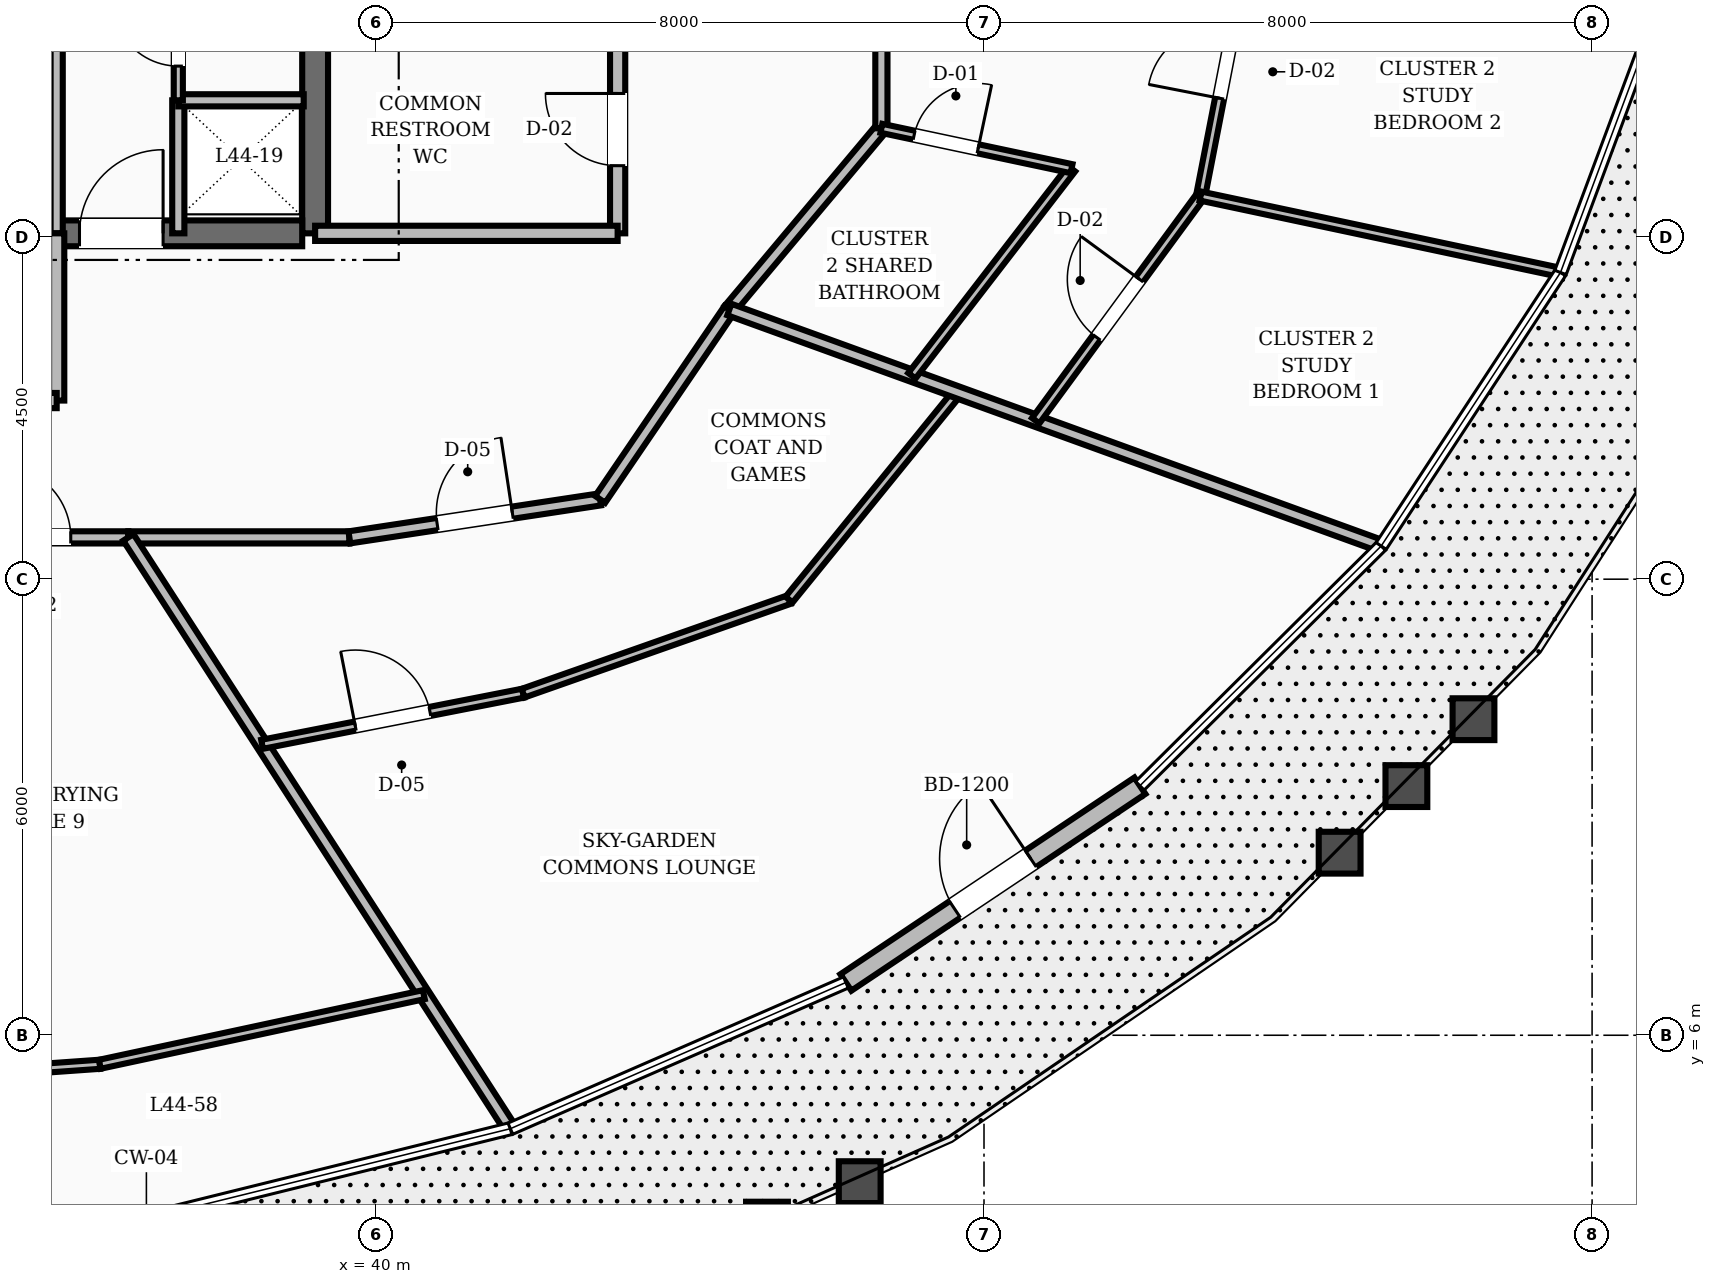
"""IFC4 building model, lengths in metres.
Left out: names, types, materials, properties, quantities, classifications, styles, units other than length and angle.
Written with IfcOpenShell. Run it as: python <this file> out.ifc"""

import sys

from ifc_helpers import new_model, si_unit, direction, frame, frame_2d, origin, place, context, subcontext, project, spatial, rectangle, extrude, element, fill, save


model = new_model("IFC4")
c1 = context("Model", 3, precision=1e-05, world=origin(), true_north=direction((0.0, 1.0)))
c2 = subcontext(c1, "Body", "Model", "MODEL_VIEW")
j1 = project(units=[si_unit("LENGTHUNIT", "METRE"), si_unit("PLANEANGLEUNIT", "RADIAN")], contexts=[c1])
p1 = place(None, origin())
s1 = spatial("IfcSite", under=j1, at=p1, CompositionType="ELEMENT")
p2 = place(p1, origin())
s2 = spatial("IfcBuilding", under=s1, at=p2, CompositionType="ELEMENT")
p3 = place(p2, frame((0.0, 0.0, 171.2)))
s3 = spatial("IfcBuildingStorey", under=s2, at=p3, CompositionType="ELEMENT", Elevation=171.2)
p4 = place(p3, frame((39.2, 16.55, 0.0), z_axis=(0.0, 0.0, 1.0), x_axis=(0.0, 1.0, 0.0)))
e1 = element("IfcWall", 1, at=p4, inside=s3, PredefinedType="SHEAR", context=c2, shape_type="SweptSolid", body=[
    extrude(rectangle(XDim=6.3, YDim=0.34, at=frame_2d((3.15, 0.0))), origin(), (0.0, 0.0, 1.0), 3.6),
])
p5 = place(p3, frame((35.8, 16.55, 0.0), z_axis=(0.0, 0.0, 1.0), x_axis=(1.0, 0.0, 0.0)))
e2 = element("IfcWall", 2, at=p5, inside=s3, PredefinedType="SHEAR", context=c2, shape_type="SweptSolid", body=[
    extrude(rectangle(XDim=3.23, YDim=0.34, at=frame_2d((1.615, 0.0))), origin(), (0.0, 0.0, 1.0), 3.6),
])
p6 = place(p5, frame((0.3, 0.0, 0.0)))
e3 = element("IfcOpeningElement", 3, at=p6, cuts=e2, PredefinedType="OPENING", context=c2, shape_type="SweptSolid", body=[
    extrude(rectangle(XDim=1.1, YDim=2.1, at=frame_2d((0.55, 1.05))), frame((0.0, 0.18, 0.0), z_axis=(0.0, -1.0, 0.0), x_axis=(1.0, 0.0, 0.0)), (0.0, 0.0, 1.0), 0.36),
])
p7 = place(p3, frame((46.183, 6.694, 0.0), z_axis=(0.0, 0.0, 1.0), x_axis=(0.831072563945, 0.556163998707, 0.0)))
e4 = element("IfcWall", 4, at=p7, inside=s3, PredefinedType="STANDARD", context=c2, shape_type="SweptSolid", body=[
    extrude(rectangle(XDim=4.655, YDim=0.26, at=frame_2d((2.327, 0.0))), origin(), (0.0, 0.0, 1.0), 2.82),
])
p8 = place(p7, frame((1.727, 0.0, 0.0)))
e5 = element("IfcOpeningElement", 5, at=p8, cuts=e4, PredefinedType="OPENING", context=c2, shape_type="SweptSolid", body=[
    extrude(rectangle(XDim=1.2, YDim=2.15, at=frame_2d((0.6, 1.075))), frame((0.0, 0.14, 0.0), z_axis=(0.0, -1.0, 0.0), x_axis=(1.0, 0.0, 0.0)), (0.0, 0.0, 1.0), 0.28),
])
p9 = place(p3, frame((43.18, 16.55, 0.0), z_axis=(0.0, 0.0, 1.0), x_axis=(0.0, 1.0, 0.0)))
e6 = element("IfcWall", 6, at=p9, inside=s3, PredefinedType="SOLIDWALL", context=c2, shape_type="SweptSolid", body=[
    extrude(rectangle(XDim=2.73, YDim=0.2, at=frame_2d((1.365, 0.0))), origin(), (0.0, 0.0, 1.0), 2.8),
])
p10 = place(p9, frame((0.89, 0.0, 0.0)))
e7 = element("IfcOpeningElement", 7, at=p10, cuts=e6, PredefinedType="OPENING", context=c2, shape_type="SweptSolid", body=[
    extrude(rectangle(XDim=0.95, YDim=2.1, at=frame_2d((0.475, 1.05))), frame((0.0, 0.11, 0.0), z_axis=(0.0, -1.0, 0.0), x_axis=(1.0, 0.0, 0.0)), (0.0, 0.0, 1.0), 0.22),
])
p11 = place(p3, frame((39.2, 16.55, 0.0), z_axis=(0.0, 0.0, 1.0), x_axis=(1.0, 0.0, 0.0)))
e8 = element("IfcWall", 8, at=p11, inside=s3, PredefinedType="SOLIDWALL", context=c2, shape_type="SweptSolid", body=[
    extrude(rectangle(XDim=3.98, YDim=0.2, at=frame_2d((1.99, 0.0))), origin(), (0.0, 0.0, 1.0), 2.8),
])
p12 = place(p3, frame((35.8, 16.55, 0.0), z_axis=(0.0, 0.0, 1.0), x_axis=(0.0, 1.0, 0.0)))
e9 = element("IfcWall", 9, at=p12, inside=s3, PredefinedType="SOLIDWALL", context=c2, shape_type="SweptSolid", body=[
    extrude(rectangle(XDim=3.3, YDim=0.16, at=frame_2d((1.65, 0.0))), origin(), (0.0, 0.0, 1.0), 2.8),
])
p13 = place(p3, frame((37.4, 16.55, 0.0), z_axis=(0.0, 0.0, 1.0), x_axis=(0.0, 1.0, 0.0)))
e10 = element("IfcWall", 10, at=p13, inside=s3, PredefinedType="SOLIDWALL", context=c2, shape_type="SweptSolid", body=[
    extrude(rectangle(XDim=1.75, YDim=0.16, at=frame_2d((0.875, 0.0))), origin(), (0.0, 0.0, 1.0), 2.8),
])
p14 = place(p3, frame((35.8, 14.35, 0.0), z_axis=(0.0, 0.0, 1.0), x_axis=(0.0, 1.0, 0.0)))
e11 = element("IfcWall", 11, at=p14, inside=s3, PredefinedType="SOLIDWALL", context=c2, shape_type="SweptSolid", body=[
    extrude(rectangle(XDim=2.2, YDim=0.2, at=frame_2d((1.1, 0.0))), origin(), (0.0, 0.0, 1.0), 2.8),
])
p15 = place(p3, frame((28.2, 14.35, 0.0), z_axis=(0.0, 0.0, 1.0), x_axis=(1.0, 0.0, 0.0)))
e12 = element("IfcWall", 12, at=p15, inside=s3, PredefinedType="SOLIDWALL", context=c2, shape_type="SweptSolid", body=[
    extrude(rectangle(XDim=7.6, YDim=0.2, at=frame_2d((3.8, 0.0))), origin(), (0.0, 0.0, 1.0), 2.8),
])
p16 = place(p15, frame((3.2, 0.0, 0.0)))
e13 = element("IfcOpeningElement", 13, at=p16, cuts=e12, PredefinedType="OPENING", context=c2, shape_type="SweptSolid", body=[
    extrude(rectangle(XDim=1.2, YDim=2.1, at=frame_2d((0.6, 1.05))), frame((0.0, 0.11, 0.0), z_axis=(0.0, -1.0, 0.0), x_axis=(1.0, 0.0, 0.0)), (0.0, 0.0, 1.0), 0.22),
])
p17 = place(p3, frame((37.4, 18.3, 0.0), z_axis=(0.0, 0.0, 1.0), x_axis=(1.0, 0.0, 0.0)))
e14 = element("IfcWall", 14, at=p17, inside=s3, PredefinedType="SOLIDWALL", context=c2, shape_type="SweptSolid", body=[
    extrude(rectangle(XDim=1.65, YDim=0.16, at=frame_2d((0.825, 0.0))), origin(), (0.0, 0.0, 1.0), 2.8),
])
p18 = place(p3, frame((37.4, 18.3, 0.0), z_axis=(0.0, 0.0, 1.0), x_axis=(0.0, 1.0, 0.0)))
e15 = element("IfcWall", 15, at=p18, inside=s3, PredefinedType="PARTITIONING", context=c2, shape_type="SweptSolid", body=[
    extrude(rectangle(XDim=4.45, YDim=0.12, at=frame_2d((2.225, 0.0))), origin(), (0.0, 0.0, 1.0), 2.8),
])
p19 = place(p18, frame((0.45, 0.0, 0.0)))
e16 = element("IfcOpeningElement", 16, at=p19, cuts=e15, PredefinedType="OPENING", context=c2, shape_type="SweptSolid", body=[
    extrude(rectangle(XDim=0.86, YDim=2.1, at=frame_2d((0.43, 1.05))), frame((0.0, 0.07, 0.0), z_axis=(0.0, -1.0, 0.0), x_axis=(1.0, 0.0, 0.0)), (0.0, 0.0, 1.0), 0.14),
])
p20 = place(p18, frame((2.65, 0.0, 0.0)))
e17 = element("IfcOpeningElement", 17, at=p20, cuts=e15, PredefinedType="OPENING", context=c2, shape_type="SweptSolid", body=[
    extrude(rectangle(XDim=0.86, YDim=2.1, at=frame_2d((0.43, 1.05))), frame((0.0, 0.07, 0.0), z_axis=(0.0, -1.0, 0.0), x_axis=(1.0, 0.0, 0.0)), (0.0, 0.0, 1.0), 0.14),
])
p21 = place(p3, frame((34.278, 12.55, 0.0), z_axis=(0.0, 0.0, 1.0), x_axis=(1.0, 0.0, 0.0)))
e18 = element("IfcWall", 18, at=p21, inside=s3, PredefinedType="SOLIDWALL", context=c2, shape_type="SweptSolid", body=[
    extrude(rectangle(XDim=2.465, YDim=0.16, at=frame_2d((1.232, 0.0))), origin(), (0.0, 0.0, 1.0), 2.8),
])
p22 = place(p21, frame((0.758, 0.0, 0.0)))
e19 = element("IfcOpeningElement", 19, at=p22, cuts=e18, PredefinedType="OPENING", context=c2, shape_type="SweptSolid", body=[
    extrude(rectangle(XDim=0.95, YDim=2.1, at=frame_2d((0.475, 1.05))), frame((0.0, 0.09, 0.0), z_axis=(0.0, -1.0, 0.0), x_axis=(1.0, 0.0, 0.0)), (0.0, 0.0, 1.0), 0.18),
])
p23 = place(p3, frame((36.743, 12.55, 0.0), z_axis=(0.0, 0.0, 1.0), x_axis=(1.0, 0.0, 0.0)))
e20 = element("IfcWall", 20, at=p23, inside=s3, PredefinedType="SOLIDWALL", context=c2, shape_type="SweptSolid", body=[
    extrude(rectangle(XDim=2.908, YDim=0.16, at=frame_2d((1.454, 0.0))), origin(), (0.0, 0.0, 1.0), 2.8),
])
p24 = place(p3, frame((39.651, 12.55, 0.0), z_axis=(0.0, 0.0, 1.0), x_axis=(0.988710906508, 0.149835721217, 0.0)))
e21 = element("IfcWall", 21, at=p24, inside=s3, PredefinedType="SOLIDWALL", context=c2, shape_type="SweptSolid", body=[
    extrude(rectangle(XDim=3.337, YDim=0.16, at=frame_2d((1.668, 0.0))), origin(), (0.0, 0.0, 1.0), 2.8),
])
p25 = place(p24, frame((1.168, 0.0, 0.0)))
e22 = element("IfcOpeningElement", 22, at=p25, cuts=e21, PredefinedType="OPENING", context=c2, shape_type="SweptSolid", body=[
    extrude(rectangle(XDim=1.0, YDim=2.1, at=frame_2d((0.5, 1.05))), frame((0.0, 0.09, 0.0), z_axis=(0.0, -1.0, 0.0), x_axis=(1.0, 0.0, 0.0)), (0.0, 0.0, 1.0), 0.18),
])
p26 = place(p3, frame((42.95, 13.05, 0.0), z_axis=(0.0, 0.0, 1.0), x_axis=(0.562674669208, 0.826678423955, 0.0)))
e23 = element("IfcWall", 23, at=p26, inside=s3, PredefinedType="SOLIDWALL", context=c2, shape_type="SweptSolid", body=[
    extrude(rectangle(XDim=3.021, YDim=0.16, at=frame_2d((1.511, 0.0))), origin(), (0.0, 0.0, 1.0), 2.8),
])
p27 = place(p3, frame((44.65, 15.548, 0.0), z_axis=(0.0, 0.0, 1.0), x_axis=(0.642665742791, 0.76614668507, 0.0)))
e24 = element("IfcWall", 24, at=p27, inside=s3, PredefinedType="SOLIDWALL", context=c2, shape_type="SweptSolid", body=[
    extrude(rectangle(XDim=3.112, YDim=0.16, at=frame_2d((1.556, 0.0))), origin(), (0.0, 0.0, 1.0), 2.8),
])
p28 = place(p3, frame((46.65, 17.932, 0.0), z_axis=(0.0, 0.0, 1.0), x_axis=(0.0, 1.0, 0.0)))
e25 = element("IfcWall", 25, at=p28, inside=s3, PredefinedType="SOLIDWALL", context=c2, shape_type="SweptSolid", body=[
    extrude(rectangle(XDim=3.154, YDim=0.16, at=frame_2d((1.577, 0.0))), origin(), (0.0, 0.0, 1.0), 2.8),
])
p29 = place(p28, frame((1.077, 0.0, 0.0)))
e26 = element("IfcOpeningElement", 26, at=p29, cuts=e25, PredefinedType="OPENING", context=c2, shape_type="SweptSolid", body=[
    extrude(rectangle(XDim=1.0, YDim=2.1, at=frame_2d((0.5, 1.05))), frame((0.0, 0.09, 0.0), z_axis=(0.0, -1.0, 0.0), x_axis=(1.0, 0.0, 0.0)), (0.0, 0.0, 1.0), 0.18),
])
p30 = place(p3, frame((36.743, 12.55, 0.0), z_axis=(0.0, 0.0, 1.0), x_axis=(0.542698414849, -0.839927634097, 0.0)))
e27 = element("IfcWall", 27, at=p30, inside=s3, PredefinedType="SOLIDWALL", context=c2, shape_type="SweptSolid", body=[
    extrude(rectangle(XDim=9.212, YDim=0.16, at=frame_2d((4.606, 0.0))), origin(), (0.0, 0.0, 1.0), 2.8),
])
p31 = place(p3, frame((38.502, 9.827, 0.0), z_axis=(0.0, 0.0, 1.0), x_axis=(0.981335177807, 0.192305145015, 0.0)))
e28 = element("IfcWall", 28, at=p31, inside=s3, PredefinedType="PARTITIONING", context=c2, shape_type="SweptSolid", body=[
    extrude(rectangle(XDim=3.5, YDim=0.12, at=frame_2d((1.75, 0.0))), origin(), (0.0, 0.0, 1.0), 2.8),
])
p32 = place(p31, frame((1.25, 0.0, 0.0)))
e29 = element("IfcOpeningElement", 29, at=p32, cuts=e28, PredefinedType="OPENING", context=c2, shape_type="SweptSolid", body=[
    extrude(rectangle(XDim=1.0, YDim=2.1, at=frame_2d((0.5, 1.05))), frame((0.0, 0.07, 0.0), z_axis=(0.0, -1.0, 0.0), x_axis=(1.0, 0.0, 0.0)), (0.0, 0.0, 1.0), 0.14),
])
p33 = place(p3, frame((41.937, 10.5, 0.0), z_axis=(0.0, 0.0, 1.0), x_axis=(0.943313154173, 0.331904042103, 0.0)))
e30 = element("IfcWall", 30, at=p33, inside=s3, PredefinedType="PARTITIONING", context=c2, shape_type="SweptSolid", body=[
    extrude(rectangle(XDim=3.709, YDim=0.12, at=frame_2d((1.854, 0.0))), origin(), (0.0, 0.0, 1.0), 2.8),
])
p34 = place(p3, frame((45.435, 11.731, 0.0), z_axis=(0.0, 0.0, 1.0), x_axis=(0.630658007355, 0.776060872457, 0.0)))
e31 = element("IfcWall", 31, at=p34, inside=s3, PredefinedType="PARTITIONING", context=c2, shape_type="SweptSolid", body=[
    extrude(rectangle(XDim=3.514, YDim=0.12, at=frame_2d((1.757, 0.0))), origin(), (0.0, 0.0, 1.0), 2.8),
])
p35 = place(p3, frame((44.65, 15.548, 0.0), z_axis=(0.0, 0.0, 1.0), x_axis=(0.940054778658, -0.341023478844, 0.0)))
e32 = element("IfcWall", 32, at=p35, inside=s3, PredefinedType="SOLIDWALL", context=c2, shape_type="SweptSolid", body=[
    extrude(rectangle(XDim=9.073, YDim=0.16, at=frame_2d((4.536, 0.0))), origin(), (0.0, 0.0, 1.0), 2.8),
])
p36 = place(p3, frame((47.051, 14.677, 0.0), z_axis=(0.0, 0.0, 1.0), x_axis=(0.61059875391, 0.791940125087, 0.0)))
e33 = element("IfcWall", 33, at=p36, inside=s3, PredefinedType="PARTITIONING", context=c2, shape_type="SweptSolid", body=[
    extrude(rectangle(XDim=3.44, YDim=0.12, at=frame_2d((1.72, 0.0))), origin(), (0.0, 0.0, 1.0), 2.8),
])
p37 = place(p3, frame((46.65, 17.932, 0.0), z_axis=(0.0, 0.0, 1.0), x_axis=(0.978187712371, -0.207722890809, 0.0)))
e34 = element("IfcWall", 34, at=p37, inside=s3, PredefinedType="PARTITIONING", context=c2, shape_type="SweptSolid", body=[
    extrude(rectangle(XDim=2.557, YDim=0.12, at=frame_2d((1.279, 0.0))), origin(), (0.0, 0.0, 1.0), 2.8),
])
p38 = place(p37, frame((0.44, 0.0, 0.0)))
e35 = element("IfcOpeningElement", 35, at=p38, cuts=e34, PredefinedType="OPENING", context=c2, shape_type="SweptSolid", body=[
    extrude(rectangle(XDim=0.86, YDim=2.1, at=frame_2d((0.43, 1.05))), frame((0.0, 0.07, 0.0), z_axis=(0.0, -1.0, 0.0), x_axis=(1.0, 0.0, 0.0)), (0.0, 0.0, 1.0), 0.14),
])
p39 = place(p3, frame((48.68, 14.085, 0.0), z_axis=(0.0, 0.0, 1.0), x_axis=(0.591730322107, 0.806135984744, 0.0)))
e36 = element("IfcWall", 36, at=p39, inside=s3, PredefinedType="PARTITIONING", context=c2, shape_type="SweptSolid", body=[
    extrude(rectangle(XDim=3.666, YDim=0.12, at=frame_2d((1.833, 0.0))), origin(), (0.0, 0.0, 1.0), 2.8),
])
p40 = place(p39, frame((1.358, 0.0, 0.0)))
e37 = element("IfcOpeningElement", 37, at=p40, cuts=e36, PredefinedType="OPENING", context=c2, shape_type="SweptSolid", body=[
    extrude(rectangle(XDim=0.95, YDim=2.1, at=frame_2d((0.475, 1.05))), frame((0.0, 0.07, 0.0), z_axis=(0.0, -1.0, 0.0), x_axis=(1.0, 0.0, 0.0)), (0.0, 0.0, 1.0), 0.14),
])
p41 = place(p3, frame((50.849, 17.04, 0.0), z_axis=(0.0, 0.0, 1.0), x_axis=(0.191067194274, 0.981576959424, 0.0)))
e38 = element("IfcWall", 38, at=p41, inside=s3, PredefinedType="PARTITIONING", context=c2, shape_type="SweptSolid", body=[
    extrude(rectangle(XDim=3.573, YDim=0.12, at=frame_2d((1.786, 0.0))), origin(), (0.0, 0.0, 1.0), 2.8),
])
p42 = place(p41, frame((1.311, 0.0, 0.0)))
e39 = element("IfcOpeningElement", 39, at=p42, cuts=e38, PredefinedType="OPENING", context=c2, shape_type="SweptSolid", body=[
    extrude(rectangle(XDim=0.95, YDim=2.1, at=frame_2d((0.475, 1.05))), frame((0.0, 0.07, 0.0), z_axis=(0.0, -1.0, 0.0), x_axis=(1.0, 0.0, 0.0)), (0.0, 0.0, 1.0), 0.14),
])
p43 = place(p3, frame((50.849, 17.04, 0.0), z_axis=(0.0, 0.0, 1.0), x_axis=(0.978199629962, -0.207666761766, 0.0)))
e40 = element("IfcWall", 40, at=p43, inside=s3, PredefinedType="PARTITIONING", context=c2, shape_type="SweptSolid", body=[
    extrude(rectangle(XDim=4.791, YDim=0.12, at=frame_2d((2.396, 0.0))), origin(), (0.0, 0.0, 1.0), 2.8),
])
p44 = place(p3, frame((32.0, 5.309, 0.0), z_axis=(0.0, 0.0, 1.0), x_axis=(0.997501538999, 0.070644742868, 0.0)))
e41 = element("IfcWall", 41, at=p44, inside=s3, PredefinedType="PARTITIONING", context=c2, shape_type="SweptSolid", body=[
    extrude(rectangle(XDim=4.379, YDim=0.12, at=frame_2d((2.189, 0.0))), origin(), (0.0, 0.0, 1.0), 2.8),
])
p45 = place(p44, frame((1.714, 0.0, 0.0)))
e42 = element("IfcOpeningElement", 42, at=p45, cuts=e41, PredefinedType="OPENING", context=c2, shape_type="SweptSolid", body=[
    extrude(rectangle(XDim=0.95, YDim=2.1, at=frame_2d((0.475, 1.05))), frame((0.0, 0.07, 0.0), z_axis=(0.0, -1.0, 0.0), x_axis=(1.0, 0.0, 0.0)), (0.0, 0.0, 1.0), 0.14),
])
p46 = place(p3, frame((36.368, 5.618, 0.0), z_axis=(0.0, 0.0, 1.0), x_axis=(0.977676028199, 0.210118023703, 0.0)))
e43 = element("IfcWall", 43, at=p46, inside=s3, PredefinedType="PARTITIONING", context=c2, shape_type="SweptSolid", body=[
    extrude(rectangle(XDim=4.36, YDim=0.12, at=frame_2d((2.18, 0.0))), origin(), (0.0, 0.0, 1.0), 2.8),
])
p47 = place(p8, origin())
e44 = element("IfcDoor", 44, at=p47, inside=s3, OperationType="SINGLE_SWING_RIGHT", PredefinedType="DOOR", context=c2, shape_type="SweptSolid", body=[
    extrude(rectangle(XDim=1.2, YDim=2.15, at=frame_2d((0.6, 1.075))), frame((0.0, 0.025, 0.0), z_axis=(0.0, -1.0, 0.0), x_axis=(1.0, 0.0, 0.0)), (0.0, 0.0, 1.0), 0.05),
])
fill(e5, e44)
p48 = place(p10, origin())
e45 = element("IfcDoor", 45, at=p48, inside=s3, OperationType="SINGLE_SWING_RIGHT", PredefinedType="DOOR", context=c2, shape_type="SweptSolid", body=[
    extrude(rectangle(XDim=0.95, YDim=2.1, at=frame_2d((0.475, 1.05))), frame((0.0, 0.025, 0.0), z_axis=(0.0, -1.0, 0.0), x_axis=(1.0, 0.0, 0.0)), (0.0, 0.0, 1.0), 0.05),
])
fill(e7, e45)
p49 = place(p6, origin())
e46 = element("IfcDoor", 46, at=p49, inside=s3, OperationType="SINGLE_SWING_RIGHT", PredefinedType="DOOR", context=c2, shape_type="SweptSolid", body=[
    extrude(rectangle(XDim=1.1, YDim=2.1, at=frame_2d((0.55, 1.05))), frame((0.0, 0.025, 0.0), z_axis=(0.0, -1.0, 0.0), x_axis=(1.0, 0.0, 0.0)), (0.0, 0.0, 1.0), 0.05),
])
fill(e3, e46)
p50 = place(p19, origin())
e47 = element("IfcDoor", 47, at=p50, inside=s3, OperationType="SINGLE_SWING_RIGHT", PredefinedType="DOOR", context=c2, shape_type="SweptSolid", body=[
    extrude(rectangle(XDim=0.86, YDim=2.1, at=frame_2d((0.43, 1.05))), frame((0.0, 0.025, 0.0), z_axis=(0.0, -1.0, 0.0), x_axis=(1.0, 0.0, 0.0)), (0.0, 0.0, 1.0), 0.05),
])
fill(e16, e47)
p51 = place(p25, origin())
e48 = element("IfcDoor", 48, at=p51, inside=s3, OperationType="SINGLE_SWING_RIGHT", PredefinedType="DOOR", context=c2, shape_type="SweptSolid", body=[
    extrude(rectangle(XDim=1.0, YDim=2.1, at=frame_2d((0.5, 1.05))), frame((0.0, 0.025, 0.0), z_axis=(0.0, -1.0, 0.0), x_axis=(1.0, 0.0, 0.0)), (0.0, 0.0, 1.0), 0.05),
])
fill(e22, e48)
p52 = place(p32, origin())
e49 = element("IfcDoor", 49, at=p52, inside=s3, OperationType="SINGLE_SWING_LEFT", PredefinedType="DOOR", context=c2, shape_type="SweptSolid", body=[
    extrude(rectangle(XDim=1.0, YDim=2.1, at=frame_2d((0.5, 1.05))), frame((0.0, 0.025, 0.0), z_axis=(0.0, -1.0, 0.0), x_axis=(1.0, 0.0, 0.0)), (0.0, 0.0, 1.0), 0.05),
])
fill(e29, e49)
p53 = place(p38, origin())
e50 = element("IfcDoor", 50, at=p53, inside=s3, OperationType="SINGLE_SWING_RIGHT", PredefinedType="DOOR", context=c2, shape_type="SweptSolid", body=[
    extrude(rectangle(XDim=0.86, YDim=2.1, at=frame_2d((0.43, 1.05))), frame((0.0, 0.025, 0.0), z_axis=(0.0, -1.0, 0.0), x_axis=(1.0, 0.0, 0.0)), (0.0, 0.0, 1.0), 0.05),
])
fill(e35, e50)
p54 = place(p40, origin())
e51 = element("IfcDoor", 51, at=p54, inside=s3, OperationType="SINGLE_SWING_RIGHT", PredefinedType="DOOR", context=c2, shape_type="SweptSolid", body=[
    extrude(rectangle(XDim=0.95, YDim=2.1, at=frame_2d((0.475, 1.05))), frame((0.0, 0.025, 0.0), z_axis=(0.0, -1.0, 0.0), x_axis=(1.0, 0.0, 0.0)), (0.0, 0.0, 1.0), 0.05),
])
fill(e37, e51)
p55 = place(p42, origin())
e52 = element("IfcDoor", 52, at=p55, inside=s3, OperationType="SINGLE_SWING_LEFT", PredefinedType="DOOR", context=c2, shape_type="SweptSolid", body=[
    extrude(rectangle(XDim=0.95, YDim=2.1, at=frame_2d((0.475, 1.05))), frame((0.0, 0.025, 0.0), z_axis=(0.0, -1.0, 0.0), x_axis=(1.0, 0.0, 0.0)), (0.0, 0.0, 1.0), 0.05),
])
fill(e39, e52)
p56 = place(p22, origin())
e53 = element("IfcDoor", 53, at=p56, inside=s3, OperationType="SINGLE_SWING_LEFT", PredefinedType="DOOR", context=c2, shape_type="SweptSolid", body=[
    extrude(rectangle(XDim=0.95, YDim=2.1, at=frame_2d((0.475, 1.05))), frame((0.0, 0.025, 0.0), z_axis=(0.0, -1.0, 0.0), x_axis=(1.0, 0.0, 0.0)), (0.0, 0.0, 1.0), 0.05),
])
fill(e19, e53)
save(model, sys.argv[1])
